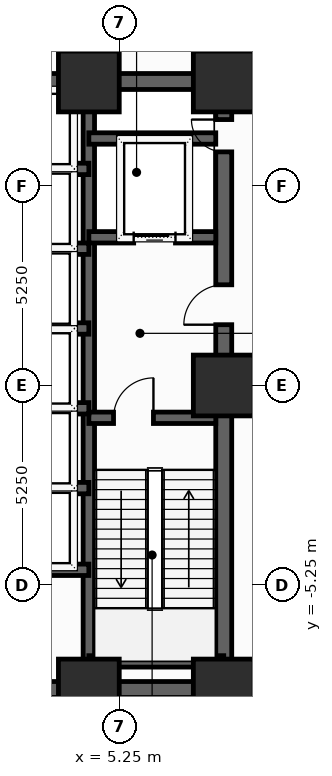
"""IFC4 building model, lengths in metres.
Left out: names, types, materials, properties, quantities, classifications, styles, units other than length and angle.
Written with IfcOpenShell. Run it as: python <this file> out.ifc"""

import sys

from ifc_helpers import new_model, si_unit, direction, frame, frame_2d, origin, origin_2d, place, context, subcontext, project, spatial, rectangle, extrude, element, fill, save


model = new_model("IFC4")
c1 = context("Model", 3, precision=1e-05, world=origin(), true_north=direction((0.0, 1.0)))
c2 = subcontext(c1, "Body", "Model", "MODEL_VIEW")
j1 = project(units=[si_unit("LENGTHUNIT", "METRE"), si_unit("PLANEANGLEUNIT", "RADIAN")], contexts=[c1])
p1 = place(None, origin())
s1 = spatial("IfcSite", under=j1, at=p1, CompositionType="ELEMENT")
p2 = place(p1, origin())
s2 = spatial("IfcBuilding", under=s1, at=p2, CompositionType="ELEMENT")
p3 = place(p2, origin())
s3 = spatial("IfcBuildingStorey", under=s2, at=p3, CompositionType="ELEMENT", Elevation=0.0)
for number, where, z_axis, x_axis in (
    (1, (4.45, -8.0, 0.0), (0.0, 0.0, 1.0), (1.0, 0.0, 0.0)),
    (2, (8.0, -8.0, 0.0), (0.0, 0.0, 1.0), (1.0, 0.0, 0.0)),
    (3, (8.0, 0.0, 0.0), (0.0, 0.0, 1.0), (1.0, 0.0, 0.0)),
    (4, (8.0, 8.0, 0.0), (0.0, 0.0, 1.0), (1.0, 0.0, 0.0)),
    (5, (4.45, 8.0, 0.0), (0.0, 0.0, 1.0), (1.0, 0.0, 0.0)),
):
    element("IfcColumn", number, at=place(p3, frame(where, z_axis=z_axis, x_axis=x_axis)), inside=s3, PredefinedType="COLUMN", context=c2, shape_type="SweptSolid", body=[
        extrude(rectangle(XDim=1.6, YDim=1.6, at=origin_2d()), origin(), (0.0, 0.0, 1.0), 5.2),
    ])
p4 = place(p3, frame((8.0, -8.0, 0.0), z_axis=(0.0, 0.0, 1.0), x_axis=(0.0, 1.0, 0.0)))
e6 = element("IfcWall", 6, at=p4, inside=s3, PredefinedType="SHEAR", context=c2, shape_type="SweptSolid", body=[
    extrude(rectangle(XDim=16.0, YDim=0.42, at=frame_2d((8.0, 0.0))), origin(), (0.0, 0.0, 1.0), 4.95),
])
p5 = place(p4, frame((9.6, 0.0, 0.0)))
e7 = element("IfcOpeningElement", 7, at=p5, cuts=e6, PredefinedType="OPENING", context=c2, shape_type="SweptSolid", body=[
    extrude(rectangle(XDim=1.05, YDim=2.15, at=frame_2d((0.525, 1.075))), frame((0.0, 0.22, 0.0), z_axis=(0.0, -1.0, 0.0), x_axis=(1.0, 0.0, 0.0)), (0.0, 0.0, 1.0), 0.44),
])
p6 = place(p4, frame((14.148, 0.0, 0.0)))
e8 = element("IfcOpeningElement", 8, at=p6, cuts=e6, PredefinedType="OPENING", context=c2, shape_type="SweptSolid", body=[
    extrude(rectangle(XDim=0.85, YDim=2.02, at=frame_2d((0.425, 1.01))), frame((0.0, 0.22, 0.0), z_axis=(0.0, -1.0, 0.0), x_axis=(1.0, 0.0, 0.0)), (0.0, 0.0, 1.0), 0.44),
])
p7 = place(p3, frame((-8.0, -8.0, 0.0), z_axis=(0.0, 0.0, 1.0), x_axis=(1.0, 0.0, 0.0)))
e9 = element("IfcWall", 9, at=p7, inside=s3, PredefinedType="SHEAR", context=c2, shape_type="SweptSolid", body=[
    extrude(rectangle(XDim=16.0, YDim=0.42, at=frame_2d((8.0, 0.0))), origin(), (0.0, 0.0, 1.0), 4.95),
])
p8 = place(p7, frame((7.52, 0.0, 0.0)))
e10 = element("IfcOpeningElement", 10, at=p8, cuts=e9, PredefinedType="OPENING", context=c2, shape_type="SweptSolid", body=[
    extrude(rectangle(XDim=0.95, YDim=2.1, at=frame_2d((0.475, 1.05))), frame((0.0, 0.22, 0.0), z_axis=(0.0, -1.0, 0.0), x_axis=(1.0, 0.0, 0.0)), (0.0, 0.0, 1.0), 0.44),
])
p9 = place(p3, frame((-8.0, 8.0, 0.0), z_axis=(0.0, 0.0, 1.0), x_axis=(1.0, 0.0, 0.0)))
e11 = element("IfcWall", 11, at=p9, inside=s3, PredefinedType="SHEAR", context=c2, shape_type="SweptSolid", body=[
    extrude(rectangle(XDim=16.0, YDim=0.42, at=frame_2d((8.0, 0.0))), origin(), (0.0, 0.0, 1.0), 4.95),
])
p10 = place(p9, frame((7.1, 0.0, 0.0)))
e12 = element("IfcOpeningElement", 12, at=p10, cuts=e11, PredefinedType="OPENING", context=c2, shape_type="SweptSolid", body=[
    extrude(rectangle(XDim=1.8, YDim=2.15, at=frame_2d((0.9, 1.075))), frame((0.0, 0.22, 0.0), z_axis=(0.0, -1.0, 0.0), x_axis=(1.0, 0.0, 0.0)), (0.0, 0.0, 1.0), 0.44),
])
p11 = place(p3, frame((4.45, -7.79, 0.0), z_axis=(0.0, 0.0, 1.0), x_axis=(0.0, 1.0, 0.0)))
e13 = element("IfcWall", 13, at=p11, inside=s3, PredefinedType="SHEAR", context=c2, shape_type="SweptSolid", body=[
    extrude(rectangle(XDim=15.58, YDim=0.3, at=frame_2d((7.79, 0.0))), origin(), (0.0, 0.0, 1.0), 4.95),
])
p12 = place(p3, frame((4.45, -0.85, 0.0), z_axis=(0.0, 0.0, 1.0), x_axis=(1.0, 0.0, 0.0)))
e14 = element("IfcWall", 14, at=p12, inside=s3, PredefinedType="SHEAR", context=c2, shape_type="SweptSolid", body=[
    extrude(rectangle(XDim=3.34, YDim=0.3, at=frame_2d((1.67, 0.0))), origin(), (0.0, 0.0, 1.0), 4.95),
])
p13 = place(p12, frame((0.65, 0.0, 0.0)))
e15 = element("IfcOpeningElement", 15, at=p13, cuts=e14, PredefinedType="OPENING", context=c2, shape_type="SweptSolid", body=[
    extrude(rectangle(XDim=1.05, YDim=2.15, at=frame_2d((0.525, 1.075))), frame((0.0, 0.16, 0.0), z_axis=(0.0, -1.0, 0.0), x_axis=(1.0, 0.0, 0.0)), (0.0, 0.0, 1.0), 0.32),
])
p14 = place(p3, frame((4.45, -7.26, 0.0), z_axis=(0.0, 0.0, 1.0), x_axis=(1.0, 0.0, 0.0)))
e16 = element("IfcWall", 16, at=p14, inside=s3, PredefinedType="SHEAR", context=c2, shape_type="SweptSolid", body=[
    extrude(rectangle(XDim=3.55, YDim=0.3, at=frame_2d((1.775, 0.0))), origin(), (0.0, 0.0, 1.0), 4.95),
])
p15 = place(p3, frame((4.45, 3.9, 0.0), z_axis=(0.0, 0.0, 1.0), x_axis=(1.0, 0.0, 0.0)))
e17 = element("IfcWall", 17, at=p15, inside=s3, PredefinedType="SHEAR", context=c2, shape_type="SweptSolid", body=[
    extrude(rectangle(XDim=3.34, YDim=0.3, at=frame_2d((1.67, 0.0))), origin(), (0.0, 0.0, 1.0), 4.95),
])
p16 = place(p15, frame((1.18, 0.0, 0.0)))
e18 = element("IfcOpeningElement", 18, at=p16, cuts=e17, PredefinedType="OPENING", context=c2, shape_type="SweptSolid", body=[
    extrude(rectangle(XDim=1.1, YDim=2.1, at=frame_2d((0.55, 1.05))), frame((0.0, 0.16, 0.0), z_axis=(0.0, -1.0, 0.0), x_axis=(1.0, 0.0, 0.0)), (0.0, 0.0, 1.0), 0.32),
])
p17 = place(p3, frame((4.45, 6.5, 0.0), z_axis=(0.0, 0.0, 1.0), x_axis=(1.0, 0.0, 0.0)))
e19 = element("IfcWall", 19, at=p17, inside=s3, PredefinedType="SHEAR", context=c2, shape_type="SweptSolid", body=[
    extrude(rectangle(XDim=3.34, YDim=0.3, at=frame_2d((1.67, 0.0))), origin(), (0.0, 0.0, 1.0), 4.95),
])
p18 = place(p3, frame((-4.45, -4.85, 0.0), z_axis=(0.0, 0.0, 1.0), x_axis=(1.0, 0.0, 0.0)))
e20 = element("IfcWall", 20, at=p18, inside=s3, PredefinedType="SHEAR", context=c2, shape_type="SweptSolid", body=[
    extrude(rectangle(XDim=8.9, YDim=0.3, at=frame_2d((4.45, 0.0))), origin(), (0.0, 0.0, 1.0), 4.95),
])
for number, where, z_axis, x_axis in (
    (21, (1.68, 1.5, 0.0), (0.0, 0.0, 1.0), (1.0, 0.0, 0.0)),
    (22, (1.68, 3.6, 0.0), (0.0, 0.0, 1.0), (1.0, 0.0, 0.0)),
    (23, (1.68, 5.7, 0.0), (0.0, 0.0, 1.0), (1.0, 0.0, 0.0)),
    (24, (1.68, -2.7, 0.0), (0.0, 0.0, 1.0), (1.0, 0.0, 0.0)),
    (25, (1.68, -0.6, 0.0), (0.0, 0.0, 1.0), (1.0, 0.0, 0.0)),
):
    element("IfcWall", number, at=place(p3, frame(where, z_axis=z_axis, x_axis=x_axis)), inside=s3, PredefinedType="SHEAR", context=c2, shape_type="SweptSolid", body=[
        extrude(rectangle(XDim=2.77, YDim=0.3, at=frame_2d((1.385, 0.0))), origin(), (0.0, 0.0, 1.0), 4.95),
    ])
p19 = place(p5, origin())
e26 = element("IfcDoor", 26, at=p19, inside=s3, OperationType="SINGLE_SWING_LEFT", PredefinedType="DOOR", context=c2, shape_type="SweptSolid", body=[
    extrude(rectangle(XDim=1.05, YDim=2.15, at=frame_2d((0.525, 1.075))), frame((0.0, 0.025, 0.0), z_axis=(0.0, -1.0, 0.0), x_axis=(1.0, 0.0, 0.0)), (0.0, 0.0, 1.0), 0.05),
])
fill(e7, e26)
p20 = place(p6, origin())
e27 = element("IfcDoor", 27, at=p20, inside=s3, OperationType="SINGLE_SWING_RIGHT", PredefinedType="TRAPDOOR", context=c2, shape_type="SweptSolid", body=[
    extrude(rectangle(XDim=0.85, YDim=2.02, at=frame_2d((0.425, 1.01))), frame((0.0, 0.025, 0.0), z_axis=(0.0, -1.0, 0.0), x_axis=(1.0, 0.0, 0.0)), (0.0, 0.0, 1.0), 0.05),
])
fill(e8, e27)
p21 = place(p13, origin())
e28 = element("IfcDoor", 28, at=p21, inside=s3, OperationType="SINGLE_SWING_RIGHT", PredefinedType="DOOR", context=c2, shape_type="SweptSolid", body=[
    extrude(rectangle(XDim=1.05, YDim=2.15, at=frame_2d((0.525, 1.075))), frame((0.0, 0.025, 0.0), z_axis=(0.0, -1.0, 0.0), x_axis=(1.0, 0.0, 0.0)), (0.0, 0.0, 1.0), 0.05),
])
fill(e15, e28)
p22 = place(p16, origin())
e29 = element("IfcDoor", 29, at=p22, inside=s3, OperationType="SLIDING_TO_LEFT", PredefinedType="DOOR", context=c2, shape_type="SweptSolid", body=[
    extrude(rectangle(XDim=1.1, YDim=2.1, at=frame_2d((0.55, 1.05))), frame((0.0, 0.025, 0.0), z_axis=(0.0, -1.0, 0.0), x_axis=(1.0, 0.0, 0.0)), (0.0, 0.0, 1.0), 0.05),
])
fill(e18, e29)
save(model, sys.argv[1])
